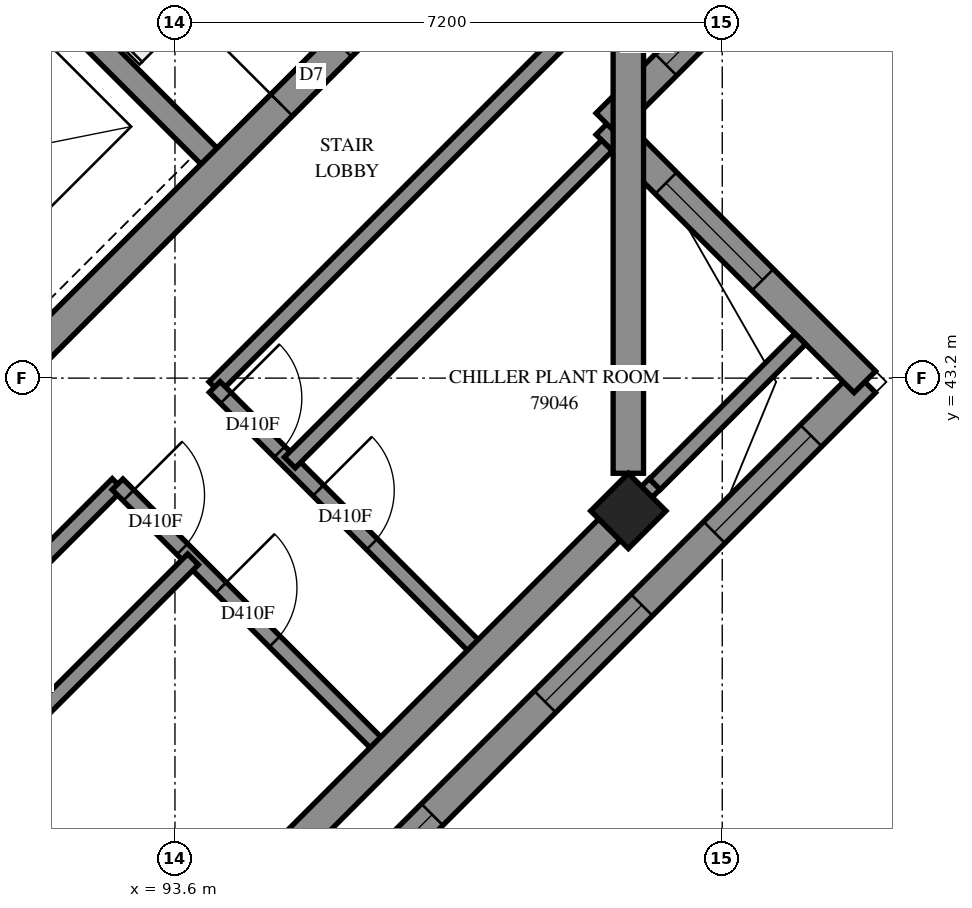
"""IFC4 building model, lengths in metres.
Left out: names, types, materials, properties, quantities, classifications, styles, units other than length and angle.
Written with IfcOpenShell. Run it as: python <this file> out.ifc"""

import sys

from ifc_helpers import new_model, si_unit, direction, frame, frame_2d, origin, origin_2d, place, context, subcontext, project, spatial, polyline, rectangle, outline, extrude, element, fill, save


model = new_model("IFC4")
c1 = context("Model", 3, precision=1e-05, world=origin(), true_north=direction((0.0, 1.0)))
c2 = subcontext(c1, "Body", "Model", "MODEL_VIEW")
j1 = project(units=[si_unit("LENGTHUNIT", "METRE"), si_unit("PLANEANGLEUNIT", "RADIAN")], contexts=[c1])
p1 = place(None, origin())
s1 = spatial("IfcSite", under=j1, at=p1, CompositionType="ELEMENT")
p2 = place(p1, origin())
s2 = spatial("IfcBuilding", under=s1, at=p2, CompositionType="ELEMENT")
p3 = place(p2, frame((0.0, 0.0, 290.6)))
s3 = spatial("IfcBuildingStorey", under=s2, at=p3, CompositionType="ELEMENT", Elevation=290.6)
p4 = place(p3, frame((99.565, 41.453, 0.0), z_axis=(0.0, 0.0, 1.0), x_axis=(0.7071067812, -0.7071067812, 0.0)))
e1 = element("IfcColumn", 1, at=p4, inside=s3, PredefinedType="COLUMN", context=c2, shape_type="SweptSolid", body=[
    extrude(rectangle(XDim=0.7, YDim=0.7, at=origin_2d()), origin(), (0.0, 0.0, 1.0), 3.5),
])
p5 = place(p3, frame((86.978, 38.766, -0.3), z_axis=(0.0, 0.0, 1.0), x_axis=(0.7071067812, 0.7071067812, 0.0)))
e2 = element("IfcWall", 2, at=p5, inside=s3, PredefinedType="SHEAR", context=c2, shape_type="SweptSolid", body=[
    extrude(rectangle(XDim=14.4, YDim=0.4, at=frame_2d((7.2, 0.0))), origin(), (0.0, 0.0, 1.0), 3.1),
])
p6 = place(p5, frame((4.55, 0.0, 0.3)))
e3 = element("IfcOpeningElement", 3, at=p6, cuts=e2, PredefinedType="OPENING", context=c2, shape_type="SweptSolid", body=[
    extrude(rectangle(XDim=1.1, YDim=2.1, at=frame_2d((0.55, 1.05))), frame((0.0, 0.21, 0.0), z_axis=(0.0, -1.0, 0.0), x_axis=(1.0, 0.0, 0.0)), (0.0, 0.0, 1.0), 0.42),
])
p7 = place(p5, frame((11.35, 0.0, 0.3)))
e4 = element("IfcOpeningElement", 4, at=p7, cuts=e2, PredefinedType="OPENING", context=c2, shape_type="SweptSolid", body=[
    extrude(rectangle(XDim=1.1, YDim=2.1, at=frame_2d((0.55, 1.05))), frame((0.0, 0.21, 0.0), z_axis=(0.0, -1.0, 0.0), x_axis=(1.0, 0.0, 0.0)), (0.0, 0.0, 1.0), 0.42),
])
p8 = place(p3, frame((88.958, 51.211, 0.0), z_axis=(0.0, 0.0, 1.0), x_axis=(0.7070998367, -0.7071137256, 0.0)))
e5 = element("IfcWall", 5, at=p8, inside=s3, PredefinedType="SOLIDWALL", context=c2, shape_type="SweptSolid", body=[
    extrude(rectangle(XDim=7.2, YDim=0.3, at=frame_2d((3.6, 0.0))), origin(), (0.0, 0.0, 1.0), 3.5),
])
p9 = place(p3, frame((89.382, 29.856, 0.0), z_axis=(0.0, 0.0, 1.0), x_axis=(0.7071094407, 0.7071041216, 0.0)))
e6 = element("IfcWall", 6, at=p9, inside=s3, PredefinedType="SOLIDWALL", context=c2, shape_type="SweptSolid", body=[
    extrude(outline(polyline([(-0.2, -0.2), (19.0, -0.2), (18.6, 0.2), (0.2, 0.2), (-0.2, -0.2)])), origin(), (0.0, 0.0, 1.0), 3.0),
])
p10 = place(p9, frame((1.9, 0.0, 0.7)))
e7 = element("IfcOpeningElement", 7, at=p10, cuts=e6, PredefinedType="OPENING", context=c2, shape_type="SweptSolid", body=[
    extrude(rectangle(XDim=1.8, YDim=2.2, at=frame_2d((0.9, 1.1))), frame((0.0, 0.21, 0.0), z_axis=(0.0, -1.0, 0.0), x_axis=(1.0, 0.0, 0.0)), (0.0, 0.0, 1.0), 0.42),
])
p11 = place(p9, frame((5.5, 0.0, 0.7)))
e8 = element("IfcOpeningElement", 8, at=p11, cuts=e6, PredefinedType="OPENING", context=c2, shape_type="SweptSolid", body=[
    extrude(rectangle(XDim=1.8, YDim=2.2, at=frame_2d((0.9, 1.1))), frame((0.0, 0.21, 0.0), z_axis=(0.0, -1.0, 0.0), x_axis=(1.0, 0.0, 0.0)), (0.0, 0.0, 1.0), 0.42),
])
p12 = place(p9, frame((8.95, 0.0, 0.7)))
e9 = element("IfcOpeningElement", 9, at=p12, cuts=e6, PredefinedType="OPENING", context=c2, shape_type="SweptSolid", body=[
    extrude(rectangle(XDim=1.8, YDim=2.2, at=frame_2d((0.9, 1.1))), frame((0.0, 0.21, 0.0), z_axis=(0.0, -1.0, 0.0), x_axis=(1.0, 0.0, 0.0)), (0.0, 0.0, 1.0), 0.42),
])
p13 = place(p9, frame((12.85, 0.0, 0.7)))
e10 = element("IfcOpeningElement", 10, at=p13, cuts=e6, PredefinedType="OPENING", context=c2, shape_type="SweptSolid", body=[
    extrude(rectangle(XDim=1.8, YDim=2.2, at=frame_2d((0.9, 1.1))), frame((0.0, 0.21, 0.0), z_axis=(0.0, -1.0, 0.0), x_axis=(1.0, 0.0, 0.0)), (0.0, 0.0, 1.0), 0.42),
])
p14 = place(p9, frame((16.0, 0.0, 0.7)))
e11 = element("IfcOpeningElement", 11, at=p14, cuts=e6, PredefinedType="OPENING", context=c2, shape_type="SweptSolid", body=[
    extrude(rectangle(XDim=1.8, YDim=2.2, at=frame_2d((0.9, 1.1))), frame((0.0, 0.21, 0.0), z_axis=(0.0, -1.0, 0.0), x_axis=(1.0, 0.0, 0.0)), (0.0, 0.0, 1.0), 0.42),
])
p15 = place(p3, frame((102.676, 43.15, 0.0), z_axis=(0.0, 0.0, 1.0), x_axis=(-0.7070963646, 0.7071171977, 0.0)))
e12 = element("IfcWall", 12, at=p15, inside=s3, PredefinedType="SOLIDWALL", context=c2, shape_type="SweptSolid", body=[
    extrude(outline(polyline([(-0.2, -0.2), (4.6, -0.2), (5.0, 0.2), (0.2, 0.2), (-0.2, -0.2)])), origin(), (0.0, 0.0, 1.0), 3.5),
])
p16 = place(p15, frame((1.9, 0.0, 0.7)))
e13 = element("IfcOpeningElement", 13, at=p16, cuts=e12, PredefinedType="OPENING", context=c2, shape_type="SweptSolid", body=[
    extrude(rectangle(XDim=1.8, YDim=2.2, at=frame_2d((0.9, 1.1))), frame((0.0, 0.21, 0.0), z_axis=(0.0, -1.0, 0.0), x_axis=(1.0, 0.0, 0.0)), (0.0, 0.0, 1.0), 0.42),
])
p17 = place(p3, frame((99.282, 46.544, 0.0), z_axis=(0.0, 0.0, 1.0), x_axis=(0.7071067812, 0.7071067812, 0.0)))
e14 = element("IfcWall", 14, at=p17, inside=s3, PredefinedType="SOLIDWALL", context=c2, shape_type="SweptSolid", body=[
    extrude(outline(polyline([(0.2, -0.2), (6.23, -0.2), (5.657, 0.2), (-0.2, 0.2), (0.2, -0.2)])), origin(), (0.0, 0.0, 1.0), 3.5),
])
p18 = place(p17, frame((1.1, 0.0, 0.7)))
e15 = element("IfcOpeningElement", 15, at=p18, cuts=e14, PredefinedType="OPENING", context=c2, shape_type="SweptSolid", body=[
    extrude(rectangle(XDim=1.8, YDim=2.2, at=frame_2d((0.9, 1.1))), frame((0.0, 0.21, 0.0), z_axis=(0.0, -1.0, 0.0), x_axis=(1.0, 0.0, 0.0)), (0.0, 0.0, 1.0), 0.42),
])
for number, where, z_axis, x_axis in (
    (16, (86.835, 35.797, 0.0), (0.0, 0.0, 1.0), (0.707, 0.707, 0.0)),
    (17, (94.12, 43.081, 0.0), (0.0, 0.0, 1.0), (0.707, 0.707, 0.0)),
):
    element("IfcWall", number, at=place(p3, frame(where, z_axis=z_axis, x_axis=x_axis)), inside=s3, PredefinedType="PARTITIONING", context=c2, shape_type="SweptSolid", body=[
        extrude(rectangle(XDim=8.499, YDim=0.2, at=frame_2d((4.25, 0.0))), origin(), (0.0, 0.0, 1.0), 3.5),
    ])
p19 = place(p3, frame((94.124, 43.084, 0.0), z_axis=(0.0, 0.0, 1.0), x_axis=(0.7071067812, -0.7071067812, 0.0)))
e18 = element("IfcWall", 18, at=p19, inside=s3, PredefinedType="PARTITIONING", context=c2, shape_type="SweptSolid", body=[
    extrude(rectangle(XDim=5.001, YDim=0.2, at=frame_2d((2.5, 0.0))), origin(), (0.0, 0.0, 1.0), 3.5),
])
p20 = place(p19, frame((0.206, 0.0, 0.0)))
e19 = element("IfcOpeningElement", 19, at=p20, cuts=e18, PredefinedType="OPENING", context=c2, shape_type="SweptSolid", body=[
    extrude(rectangle(XDim=1.0, YDim=2.1, at=frame_2d((0.5, 1.05))), frame((0.0, 0.11, 0.0), z_axis=(0.0, -1.0, 0.0), x_axis=(1.0, 0.0, 0.0)), (0.0, 0.0, 1.0), 0.22),
])
p21 = place(p19, frame((1.925, 0.0, 0.0)))
e20 = element("IfcOpeningElement", 20, at=p21, cuts=e18, PredefinedType="OPENING", context=c2, shape_type="SweptSolid", body=[
    extrude(rectangle(XDim=1.0, YDim=2.1, at=frame_2d((0.5, 1.05))), frame((0.0, 0.11, 0.0), z_axis=(0.0, -1.0, 0.0), x_axis=(1.0, 0.0, 0.0)), (0.0, 0.0, 1.0), 0.22),
])
p22 = place(p3, frame((92.845, 41.803, 0.0), z_axis=(0.0, 0.0, 1.0), x_axis=(0.7071067812, -0.7071067812, 0.0)))
e21 = element("IfcWall", 21, at=p22, inside=s3, PredefinedType="PARTITIONING", context=c2, shape_type="SweptSolid", body=[
    extrude(rectangle(XDim=4.998, YDim=0.2, at=frame_2d((2.499, 0.0))), origin(), (0.0, 0.0, 1.0), 3.5),
])
p23 = place(p22, frame((0.205, 0.0, 0.0)))
e22 = element("IfcOpeningElement", 22, at=p23, cuts=e21, PredefinedType="OPENING", context=c2, shape_type="SweptSolid", body=[
    extrude(rectangle(XDim=1.0, YDim=2.1, at=frame_2d((0.5, 1.05))), frame((0.0, 0.11, 0.0), z_axis=(0.0, -1.0, 0.0), x_axis=(1.0, 0.0, 0.0)), (0.0, 0.0, 1.0), 0.22),
])
p24 = place(p22, frame((1.924, 0.0, 0.0)))
e23 = element("IfcOpeningElement", 23, at=p24, cuts=e21, PredefinedType="OPENING", context=c2, shape_type="SweptSolid", body=[
    extrude(rectangle(XDim=1.0, YDim=2.1, at=frame_2d((0.5, 1.05))), frame((0.0, 0.11, 0.0), z_axis=(0.0, -1.0, 0.0), x_axis=(1.0, 0.0, 0.0)), (0.0, 0.0, 1.0), 0.22),
])
p25 = place(p3, frame((97.653, 39.547, 0.0), z_axis=(0.0, 0.0, 1.0), x_axis=(0.7066684208, 0.70754487, 0.0)))
e24 = element("IfcWall", 24, at=p25, inside=s3, PredefinedType="PARTITIONING", context=c2, shape_type="SweptSolid", body=[
    extrude(rectangle(XDim=3.195, YDim=0.2, at=frame_2d((1.597, 0.0))), origin(), (0.0, 0.0, 1.0), 3.0),
])
p26 = place(p3, frame((94.823, 36.713, 0.0), z_axis=(0.0, 0.0, 1.0), x_axis=(0.7066530715, 0.7075602, 0.0)))
e25 = element("IfcWall", 25, at=p26, inside=s3, PredefinedType="PARTITIONING", context=c2, shape_type="SweptSolid", body=[
    extrude(rectangle(XDim=2.205, YDim=0.2, at=frame_2d((1.102, 0.0))), origin(), (0.0, 0.0, 1.0), 3.0),
])
p27 = place(p3, frame((96.385, 38.269, 0.0), z_axis=(0.0, 0.0, 1.0), x_axis=(0.7076620277, 0.7065510983, 0.0)))
e26 = element("IfcWall", 26, at=p27, inside=s3, PredefinedType="PARTITIONING", context=c2, shape_type="SweptSolid", body=[
    extrude(rectangle(XDim=1.8, YDim=0.2, at=frame_2d((0.9, 0.0))), origin(), (0.0, 0.0, 1.0), 3.0),
])
p28 = place(p3, frame((86.271, 33.251, 0.0), z_axis=(0.0, 0.0, 1.0), x_axis=(0.7071908866, 0.7070226658, 0.0)))
e27 = element("IfcWall", 27, at=p28, inside=s3, PredefinedType="PARTITIONING", context=c2, shape_type="SweptSolid", body=[
    extrude(outline(polyline([(0.0, -0.1), (10.7, -0.1), (10.7, 0.1), (0.0, 0.1), (0.0, -0.1)])), origin(), (0.0, 0.0, 1.0), 3.5),
])
p29 = place(p3, frame((95.111, 42.089, 0.0), z_axis=(0.0, 0.0, 1.0), x_axis=(0.7072762658, 0.7069372559, 0.0)))
e28 = element("IfcWall", 28, at=p29, inside=s3, PredefinedType="PARTITIONING", context=c2, shape_type="SweptSolid", body=[
    extrude(outline(polyline([(0.0, -0.1), (5.899, -0.1), (5.899, 0.1), (0.0, 0.1), (0.0, -0.1)])), origin(), (0.0, 0.0, 1.0), 3.5),
])
p30 = place(p3, frame((99.914, 41.804, 0.0), z_axis=(0.0, 0.0, 1.0), x_axis=(0.7071067812, 0.7071067812, 0.0)))
e29 = element("IfcWall", 29, at=p30, inside=s3, PredefinedType="PARTITIONING", context=c2, shape_type="SweptSolid", body=[
    extrude(outline(polyline([(0.0, -0.1), (2.705, -0.1), (2.705, 0.1), (0.0, 0.1), (0.0, -0.1)])), origin(), (0.0, 0.0, 1.0), 3.5),
])
p31 = place(p12, origin())
e30 = element("IfcWindow", 30, at=p31, inside=s3, PartitioningType="SINGLE_PANEL", PredefinedType="WINDOW", context=c2, shape_type="SweptSolid", body=[
    extrude(rectangle(XDim=1.8, YDim=2.2, at=frame_2d((0.9, 1.1))), frame((0.0, 0.08, 0.0), z_axis=(0.0, -1.0, 0.0), x_axis=(1.0, 0.0, 0.0)), (0.0, 0.0, 1.0), 0.06),
])
fill(e9, e30)
p32 = place(p13, origin())
e31 = element("IfcWindow", 31, at=p32, inside=s3, PartitioningType="SINGLE_PANEL", PredefinedType="WINDOW", context=c2, shape_type="SweptSolid", body=[
    extrude(rectangle(XDim=1.8, YDim=2.2, at=frame_2d((0.9, 1.1))), frame((0.0, 0.08, 0.0), z_axis=(0.0, -1.0, 0.0), x_axis=(1.0, 0.0, 0.0)), (0.0, 0.0, 1.0), 0.06),
])
fill(e10, e31)
p33 = place(p14, origin())
e32 = element("IfcWindow", 32, at=p33, inside=s3, PartitioningType="SINGLE_PANEL", PredefinedType="WINDOW", context=c2, shape_type="SweptSolid", body=[
    extrude(rectangle(XDim=1.8, YDim=2.2, at=frame_2d((0.9, 1.1))), frame((0.0, 0.08, 0.0), z_axis=(0.0, -1.0, 0.0), x_axis=(1.0, 0.0, 0.0)), (0.0, 0.0, 1.0), 0.06),
])
fill(e11, e32)
p34 = place(p16, origin())
e33 = element("IfcWindow", 33, at=p34, inside=s3, PartitioningType="SINGLE_PANEL", PredefinedType="WINDOW", context=c2, shape_type="SweptSolid", body=[
    extrude(rectangle(XDim=1.8, YDim=2.2, at=frame_2d((0.9, 1.1))), frame((0.0, 0.08, 0.0), z_axis=(0.0, -1.0, 0.0), x_axis=(1.0, 0.0, 0.0)), (0.0, 0.0, 1.0), 0.06),
])
fill(e13, e33)
p35 = place(p18, origin())
e34 = element("IfcWindow", 34, at=p35, inside=s3, PartitioningType="SINGLE_PANEL", PredefinedType="WINDOW", context=c2, shape_type="SweptSolid", body=[
    extrude(rectangle(XDim=1.8, YDim=2.2, at=frame_2d((0.9, 1.1))), frame((0.0, 0.08, 0.0), z_axis=(0.0, -1.0, 0.0), x_axis=(1.0, 0.0, 0.0)), (0.0, 0.0, 1.0), 0.06),
])
fill(e15, e34)
p36 = place(p7, origin())
e35 = element("IfcDoor", 35, at=p36, inside=s3, OperationType="SINGLE_SWING_RIGHT", PredefinedType="DOOR", context=c2, shape_type="SweptSolid", body=[
    extrude(rectangle(XDim=1.1, YDim=2.1, at=frame_2d((0.55, 1.05))), frame((0.0, 0.025, 0.0), z_axis=(0.0, -1.0, 0.0), x_axis=(1.0, 0.0, 0.0)), (0.0, 0.0, 1.0), 0.05),
])
fill(e4, e35)
p37 = place(p20, origin())
e36 = element("IfcDoor", 36, at=p37, inside=s3, OperationType="SINGLE_SWING_LEFT", PredefinedType="DOOR", context=c2, shape_type="SweptSolid", body=[
    extrude(rectangle(XDim=1.0, YDim=2.1, at=frame_2d((0.5, 1.05))), frame((0.0, 0.025, 0.0), z_axis=(0.0, -1.0, 0.0), x_axis=(1.0, 0.0, 0.0)), (0.0, 0.0, 1.0), 0.05),
])
fill(e19, e36)
p38 = place(p23, origin())
e37 = element("IfcDoor", 37, at=p38, inside=s3, OperationType="SINGLE_SWING_RIGHT", PredefinedType="DOOR", context=c2, shape_type="SweptSolid", body=[
    extrude(rectangle(XDim=1.0, YDim=2.1, at=frame_2d((0.5, 1.05))), frame((0.0, 0.025, 0.0), z_axis=(0.0, -1.0, 0.0), x_axis=(1.0, 0.0, 0.0)), (0.0, 0.0, 1.0), 0.05),
])
fill(e22, e37)
p39 = place(p24, origin())
e38 = element("IfcDoor", 38, at=p39, inside=s3, OperationType="SINGLE_SWING_LEFT", PredefinedType="DOOR", context=c2, shape_type="SweptSolid", body=[
    extrude(rectangle(XDim=1.0, YDim=2.1, at=frame_2d((0.5, 1.05))), frame((0.0, 0.025, 0.0), z_axis=(0.0, -1.0, 0.0), x_axis=(1.0, 0.0, 0.0)), (0.0, 0.0, 1.0), 0.05),
])
fill(e23, e38)
p40 = place(p21, origin())
e39 = element("IfcDoor", 39, at=p40, inside=s3, OperationType="SINGLE_SWING_RIGHT", PredefinedType="DOOR", context=c2, shape_type="SweptSolid", body=[
    extrude(rectangle(XDim=1.0, YDim=2.1, at=frame_2d((0.5, 1.05))), frame((0.0, 0.025, 0.0), z_axis=(0.0, -1.0, 0.0), x_axis=(1.0, 0.0, 0.0)), (0.0, 0.0, 1.0), 0.05),
])
fill(e20, e39)
save(model, sys.argv[1])
